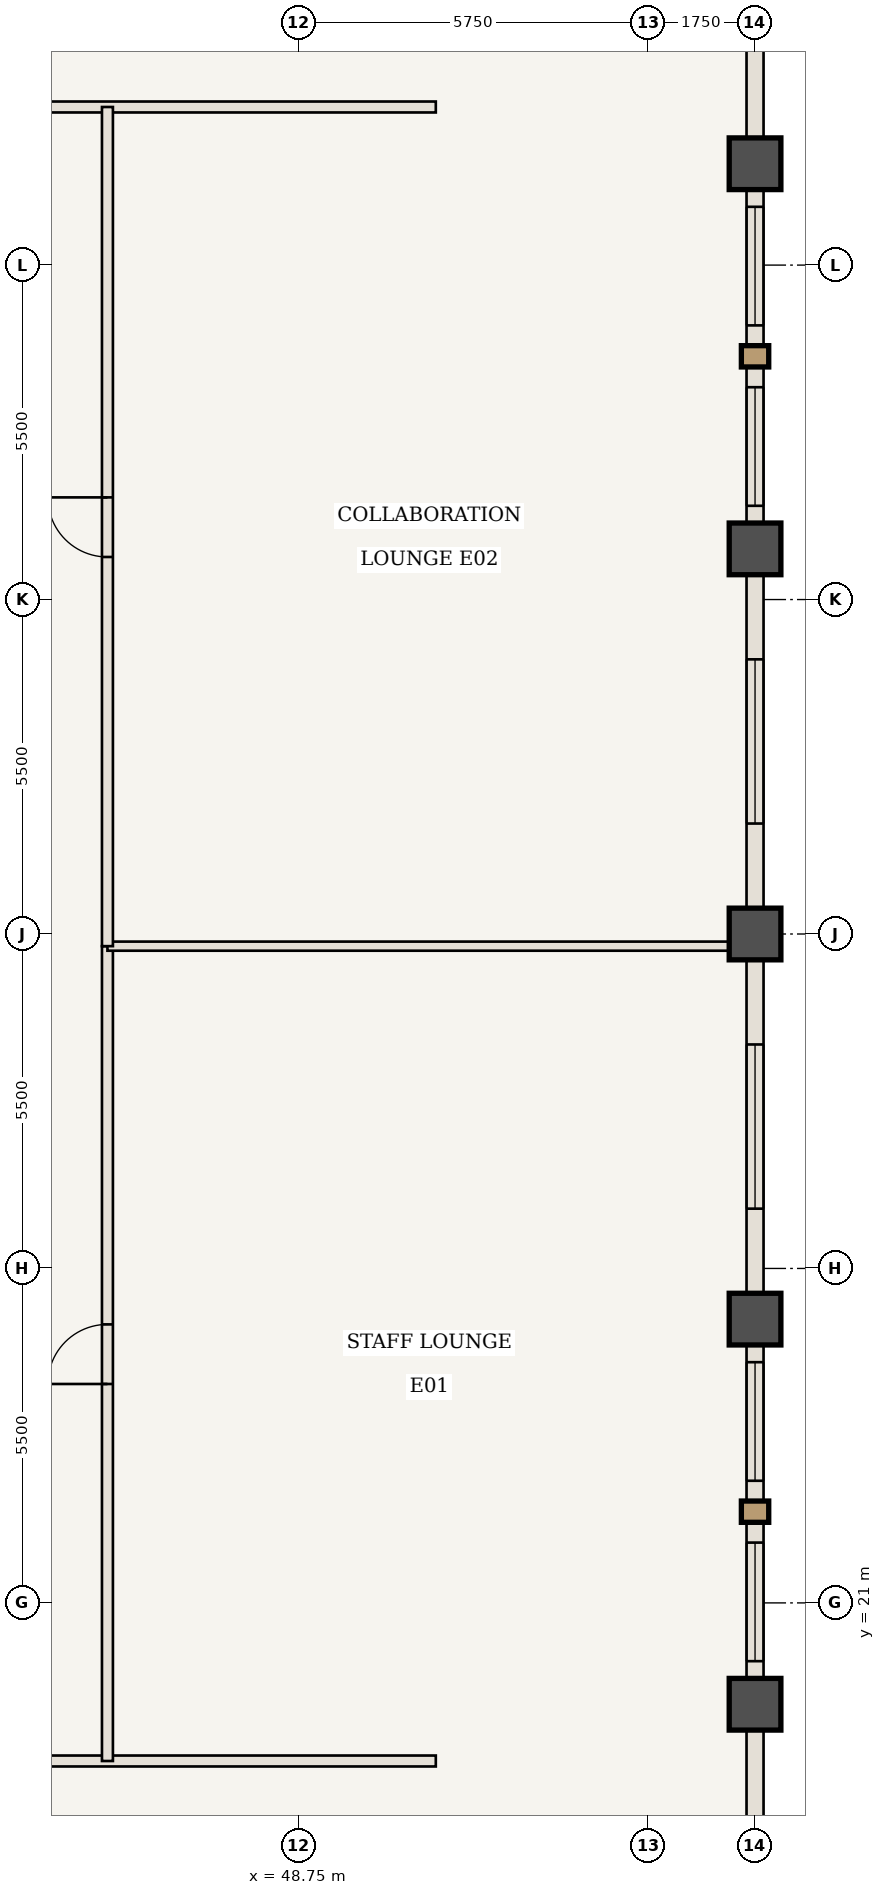
"""IFC4 building model, lengths in metres.
Left out: names, types, materials, properties, quantities, classifications, styles, units other than length and angle.
Written with IfcOpenShell. Run it as: python <this file> out.ifc"""

import sys

from ifc_helpers import new_model, si_unit, direction, frame, frame_2d, origin, origin_2d, place, context, subcontext, project, spatial, rectangle, extrude, element, fill, save


model = new_model("IFC4")
c1 = context("Model", 3, precision=1e-05, world=origin(), true_north=direction((0.0, 1.0)))
c2 = subcontext(c1, "Body", "Model", "MODEL_VIEW")
j1 = project(units=[si_unit("LENGTHUNIT", "METRE"), si_unit("PLANEANGLEUNIT", "RADIAN")], contexts=[c1])
p1 = place(None, origin())
s1 = spatial("IfcSite", under=j1, at=p1, CompositionType="ELEMENT")
p2 = place(p1, origin())
s2 = spatial("IfcBuilding", under=s1, at=p2, CompositionType="ELEMENT")
p3 = place(p2, frame((0.0, 0.0, 186.9)))
s3 = spatial("IfcBuildingStorey", under=s2, at=p3, CompositionType="ELEMENT", Elevation=186.9)
for number, where, z_axis, x_axis in (
    (1, (56.25, 19.333, 0.0), (0.0, 0.0, 1.0), (1.0, 0.0, 0.0)),
    (2, (56.25, 25.667, 0.0), (0.0, 0.0, 1.0), (1.0, 0.0, 0.0)),
    (3, (56.25, 32.0, 0.0), (0.0, 0.0, 1.0), (1.0, 0.0, 0.0)),
    (4, (56.25, 38.333, 0.0), (0.0, 0.0, 1.0), (1.0, 0.0, 0.0)),
    (5, (56.25, 44.667, 0.0), (0.0, 0.0, 1.0), (1.0, 0.0, 0.0)),
):
    element("IfcColumn", number, at=place(p3, frame(where, z_axis=z_axis, x_axis=x_axis)), inside=s3, PredefinedType="COLUMN", context=c2, shape_type="SweptSolid", body=[
        extrude(rectangle(XDim=0.85, YDim=0.85, at=origin_2d()), origin(), (0.0, 0.0, 1.0), 3.85),
    ])
p4 = place(p3, frame((13.0, 18.4, 0.0), z_axis=(0.0, 0.0, 1.0), x_axis=(1.0, 0.0, 0.0)))
e6 = element("IfcWall", 6, at=p4, inside=s3, PredefinedType="STANDARD", context=c2, shape_type="SweptSolid", body=[
    extrude(rectangle(XDim=38.0, YDim=0.18, at=frame_2d((19.0, 0.0))), origin(), (0.0, 0.0, 1.0), 3.43),
])
p5 = place(p4, frame((19.925, 0.0, 0.0)))
e7 = element("IfcOpeningElement", 7, at=p5, cuts=e6, PredefinedType="OPENING", context=c2, shape_type="SweptSolid", body=[
    extrude(rectangle(XDim=0.98, YDim=2.2, at=frame_2d((0.49, 1.1))), frame((0.0, 0.1, 0.0), z_axis=(0.0, -1.0, 0.0), x_axis=(1.0, 0.0, 0.0)), (0.0, 0.0, 1.0), 0.2),
])
p6 = place(p3, frame((39.083, 45.6, 0.0), z_axis=(0.0, 0.0, 1.0), x_axis=(1.0, 0.0, 0.0)))
e8 = element("IfcWall", 8, at=p6, inside=s3, PredefinedType="STANDARD", context=c2, shape_type="SweptSolid", body=[
    extrude(rectangle(XDim=11.917, YDim=0.18, at=frame_2d((5.958, 0.0))), origin(), (0.0, 0.0, 1.0), 3.43),
])
p7 = place(p6, frame((1.283, 0.0, 0.0)))
e9 = element("IfcOpeningElement", 9, at=p7, cuts=e8, PredefinedType="OPENING", context=c2, shape_type="SweptSolid", body=[
    extrude(rectangle(XDim=0.98, YDim=2.2, at=frame_2d((0.49, 1.1))), frame((0.0, 0.1, 0.0), z_axis=(0.0, -1.0, 0.0), x_axis=(1.0, 0.0, 0.0)), (0.0, 0.0, 1.0), 0.2),
])
p8 = place(p3, frame((45.6, 18.4, 0.0), z_axis=(0.0, 0.0, 1.0), x_axis=(0.0, 1.0, 0.0)))
e10 = element("IfcWall", 10, at=p8, inside=s3, PredefinedType="STANDARD", context=c2, shape_type="SweptSolid", body=[
    extrude(rectangle(XDim=13.4, YDim=0.18, at=frame_2d((6.7, 0.0))), origin(), (0.0, 0.0, 1.0), 3.43),
])
p9 = place(p8, frame((6.2, 0.0, 0.0)))
e11 = element("IfcOpeningElement", 11, at=p9, cuts=e10, PredefinedType="OPENING", context=c2, shape_type="SweptSolid", body=[
    extrude(rectangle(XDim=0.98, YDim=2.2, at=frame_2d((0.49, 1.1))), frame((0.0, 0.1, 0.0), z_axis=(0.0, -1.0, 0.0), x_axis=(1.0, 0.0, 0.0)), (0.0, 0.0, 1.0), 0.2),
])
p10 = place(p3, frame((45.6, 31.8, 0.0), z_axis=(0.0, 0.0, 1.0), x_axis=(1.0, 0.0, 0.0)))
e12 = element("IfcWall", 12, at=p10, inside=s3, PredefinedType="STANDARD", context=c2, shape_type="SweptSolid", body=[
    extrude(rectangle(XDim=10.59, YDim=0.15, at=frame_2d((5.295, 0.0))), origin(), (0.0, 0.0, 1.0), 2.879),
])
p11 = place(p3, frame((45.6, 31.8, 0.0), z_axis=(0.0, 0.0, 1.0), x_axis=(0.0, 1.0, 0.0)))
e13 = element("IfcWall", 13, at=p11, inside=s3, PredefinedType="STANDARD", context=c2, shape_type="SweptSolid", body=[
    extrude(rectangle(XDim=13.8, YDim=0.18, at=frame_2d((6.9, 0.0))), origin(), (0.0, 0.0, 1.0), 3.43),
])
p12 = place(p11, frame((6.4, 0.0, 0.0)))
e14 = element("IfcOpeningElement", 14, at=p12, cuts=e13, PredefinedType="OPENING", context=c2, shape_type="SweptSolid", body=[
    extrude(rectangle(XDim=0.98, YDim=2.2, at=frame_2d((0.49, 1.1))), frame((0.0, 0.1, 0.0), z_axis=(0.0, -1.0, 0.0), x_axis=(1.0, 0.0, 0.0)), (0.0, 0.0, 1.0), 0.2),
])
p13 = place(p3, frame((56.25, 19.333, 0.0), z_axis=(0.0, 0.0, 1.0), x_axis=(0.0, -1.0, 0.0)))
e15 = element("IfcWall", 15, at=p13, inside=s3, PredefinedType="USERDEFINED", context=c2, shape_type="SweptSolid", body=[
    extrude(rectangle(XDim=6.333, YDim=0.28, at=frame_2d((3.167, 0.0))), origin(), (0.0, 0.0, 1.0), 2.73),
])
p14 = place(p3, frame((56.25, 25.667, 0.0), z_axis=(0.0, 0.0, 1.0), x_axis=(0.0, -1.0, 0.0)))
e16 = element("IfcWall", 16, at=p14, inside=s3, PredefinedType="USERDEFINED", context=c2, shape_type="SweptSolid", body=[
    extrude(rectangle(XDim=6.333, YDim=0.28, at=frame_2d((3.167, 0.0))), origin(), (0.0, 0.0, 1.0), 2.73),
])
p15 = place(p14, frame((0.708, 0.0, 0.85)))
e17 = element("IfcOpeningElement", 17, at=p15, cuts=e16, PredefinedType="OPENING", context=c2, shape_type="SweptSolid", body=[
    extrude(rectangle(XDim=1.95, YDim=1.68, at=frame_2d((0.975, 0.84))), frame((0.0, 0.15, 0.0), z_axis=(0.0, -1.0, 0.0), x_axis=(1.0, 0.0, 0.0)), (0.0, 0.0, 1.0), 0.3),
])
p16 = place(p14, frame((3.675, 0.0, 0.85)))
e18 = element("IfcOpeningElement", 18, at=p16, cuts=e16, PredefinedType="OPENING", context=c2, shape_type="SweptSolid", body=[
    extrude(rectangle(XDim=1.95, YDim=1.68, at=frame_2d((0.975, 0.84))), frame((0.0, 0.15, 0.0), z_axis=(0.0, -1.0, 0.0), x_axis=(1.0, 0.0, 0.0)), (0.0, 0.0, 1.0), 0.3),
])
p17 = place(p3, frame((56.25, 32.0, 0.0), z_axis=(0.0, 0.0, 1.0), x_axis=(0.0, -1.0, 0.0)))
e19 = element("IfcWall", 19, at=p17, inside=s3, PredefinedType="USERDEFINED", context=c2, shape_type="SweptSolid", body=[
    extrude(rectangle(XDim=6.333, YDim=0.28, at=frame_2d((3.167, 0.0))), origin(), (0.0, 0.0, 1.0), 2.73),
])
p18 = place(p17, frame((1.817, 0.0, 0.85)))
e20 = element("IfcOpeningElement", 20, at=p18, cuts=e19, PredefinedType="OPENING", context=c2, shape_type="SweptSolid", body=[
    extrude(rectangle(XDim=2.7, YDim=1.68, at=frame_2d((1.35, 0.84))), frame((0.0, 0.15, 0.0), z_axis=(0.0, -1.0, 0.0), x_axis=(1.0, 0.0, 0.0)), (0.0, 0.0, 1.0), 0.3),
])
p19 = place(p3, frame((56.25, 38.333, 0.0), z_axis=(0.0, 0.0, 1.0), x_axis=(0.0, -1.0, 0.0)))
e21 = element("IfcWall", 21, at=p19, inside=s3, PredefinedType="USERDEFINED", context=c2, shape_type="SweptSolid", body=[
    extrude(rectangle(XDim=6.333, YDim=0.28, at=frame_2d((3.167, 0.0))), origin(), (0.0, 0.0, 1.0), 2.73),
])
p20 = place(p19, frame((1.817, 0.0, 0.85)))
e22 = element("IfcOpeningElement", 22, at=p20, cuts=e21, PredefinedType="OPENING", context=c2, shape_type="SweptSolid", body=[
    extrude(rectangle(XDim=2.7, YDim=1.68, at=frame_2d((1.35, 0.84))), frame((0.0, 0.15, 0.0), z_axis=(0.0, -1.0, 0.0), x_axis=(1.0, 0.0, 0.0)), (0.0, 0.0, 1.0), 0.3),
])
p21 = place(p3, frame((56.25, 44.667, 0.0), z_axis=(0.0, 0.0, 1.0), x_axis=(0.0, -1.0, 0.0)))
e23 = element("IfcWall", 23, at=p21, inside=s3, PredefinedType="USERDEFINED", context=c2, shape_type="SweptSolid", body=[
    extrude(rectangle(XDim=6.333, YDim=0.28, at=frame_2d((3.167, 0.0))), origin(), (0.0, 0.0, 1.0), 2.73),
])
p22 = place(p21, frame((0.708, 0.0, 0.85)))
e24 = element("IfcOpeningElement", 24, at=p22, cuts=e23, PredefinedType="OPENING", context=c2, shape_type="SweptSolid", body=[
    extrude(rectangle(XDim=1.95, YDim=1.68, at=frame_2d((0.975, 0.84))), frame((0.0, 0.15, 0.0), z_axis=(0.0, -1.0, 0.0), x_axis=(1.0, 0.0, 0.0)), (0.0, 0.0, 1.0), 0.3),
])
p23 = place(p21, frame((3.675, 0.0, 0.85)))
e25 = element("IfcOpeningElement", 25, at=p23, cuts=e23, PredefinedType="OPENING", context=c2, shape_type="SweptSolid", body=[
    extrude(rectangle(XDim=1.95, YDim=1.68, at=frame_2d((0.975, 0.84))), frame((0.0, 0.15, 0.0), z_axis=(0.0, -1.0, 0.0), x_axis=(1.0, 0.0, 0.0)), (0.0, 0.0, 1.0), 0.3),
])
p24 = place(p3, frame((56.25, 51.0, 0.0), z_axis=(0.0, 0.0, 1.0), x_axis=(0.0, -1.0, 0.0)))
e26 = element("IfcWall", 26, at=p24, inside=s3, PredefinedType="USERDEFINED", context=c2, shape_type="SweptSolid", body=[
    extrude(rectangle(XDim=6.333, YDim=0.28, at=frame_2d((3.167, 0.0))), origin(), (0.0, 0.0, 1.0), 2.73),
])
p25 = place(p9, origin())
e27 = element("IfcDoor", 27, at=p25, inside=s3, OperationType="SINGLE_SWING_LEFT", PredefinedType="DOOR", context=c2, shape_type="SweptSolid", body=[
    extrude(rectangle(XDim=0.98, YDim=2.2, at=frame_2d((0.49, 1.1))), frame((0.0, 0.025, 0.0), z_axis=(0.0, -1.0, 0.0), x_axis=(1.0, 0.0, 0.0)), (0.0, 0.0, 1.0), 0.05),
])
fill(e11, e27)
p26 = place(p12, origin())
e28 = element("IfcDoor", 28, at=p26, inside=s3, OperationType="SINGLE_SWING_RIGHT", PredefinedType="DOOR", context=c2, shape_type="SweptSolid", body=[
    extrude(rectangle(XDim=0.98, YDim=2.2, at=frame_2d((0.49, 1.1))), frame((0.0, 0.025, 0.0), z_axis=(0.0, -1.0, 0.0), x_axis=(1.0, 0.0, 0.0)), (0.0, 0.0, 1.0), 0.05),
])
fill(e14, e28)
p27 = place(p15, origin())
e29 = element("IfcWindow", 29, at=p27, inside=s3, PartitioningType="SINGLE_PANEL", PredefinedType="WINDOW", context=c2, shape_type="SweptSolid", body=[
    extrude(rectangle(XDim=1.95, YDim=1.68, at=frame_2d((0.975, 0.84))), frame((0.0, 0.03, 0.0), z_axis=(0.0, -1.0, 0.0), x_axis=(1.0, 0.0, 0.0)), (0.0, 0.0, 1.0), 0.06),
])
fill(e17, e29)
p28 = place(p16, origin())
e30 = element("IfcWindow", 30, at=p28, inside=s3, PartitioningType="SINGLE_PANEL", PredefinedType="WINDOW", context=c2, shape_type="SweptSolid", body=[
    extrude(rectangle(XDim=1.95, YDim=1.68, at=frame_2d((0.975, 0.84))), frame((0.0, 0.03, 0.0), z_axis=(0.0, -1.0, 0.0), x_axis=(1.0, 0.0, 0.0)), (0.0, 0.0, 1.0), 0.06),
])
fill(e18, e30)
p29 = place(p18, origin())
e31 = element("IfcWindow", 31, at=p29, inside=s3, PartitioningType="SINGLE_PANEL", PredefinedType="WINDOW", context=c2, shape_type="SweptSolid", body=[
    extrude(rectangle(XDim=2.7, YDim=1.68, at=frame_2d((1.35, 0.84))), frame((0.0, 0.03, 0.0), z_axis=(0.0, -1.0, 0.0), x_axis=(1.0, 0.0, 0.0)), (0.0, 0.0, 1.0), 0.06),
])
fill(e20, e31)
p30 = place(p20, origin())
e32 = element("IfcWindow", 32, at=p30, inside=s3, PartitioningType="SINGLE_PANEL", PredefinedType="WINDOW", context=c2, shape_type="SweptSolid", body=[
    extrude(rectangle(XDim=2.7, YDim=1.68, at=frame_2d((1.35, 0.84))), frame((0.0, 0.03, 0.0), z_axis=(0.0, -1.0, 0.0), x_axis=(1.0, 0.0, 0.0)), (0.0, 0.0, 1.0), 0.06),
])
fill(e22, e32)
p31 = place(p22, origin())
e33 = element("IfcWindow", 33, at=p31, inside=s3, PartitioningType="SINGLE_PANEL", PredefinedType="WINDOW", context=c2, shape_type="SweptSolid", body=[
    extrude(rectangle(XDim=1.95, YDim=1.68, at=frame_2d((0.975, 0.84))), frame((0.0, 0.03, 0.0), z_axis=(0.0, -1.0, 0.0), x_axis=(1.0, 0.0, 0.0)), (0.0, 0.0, 1.0), 0.06),
])
fill(e24, e33)
p32 = place(p23, origin())
e34 = element("IfcWindow", 34, at=p32, inside=s3, PartitioningType="SINGLE_PANEL", PredefinedType="WINDOW", context=c2, shape_type="SweptSolid", body=[
    extrude(rectangle(XDim=1.95, YDim=1.68, at=frame_2d((0.975, 0.84))), frame((0.0, 0.03, 0.0), z_axis=(0.0, -1.0, 0.0), x_axis=(1.0, 0.0, 0.0)), (0.0, 0.0, 1.0), 0.06),
])
fill(e25, e34)
save(model, sys.argv[1])
